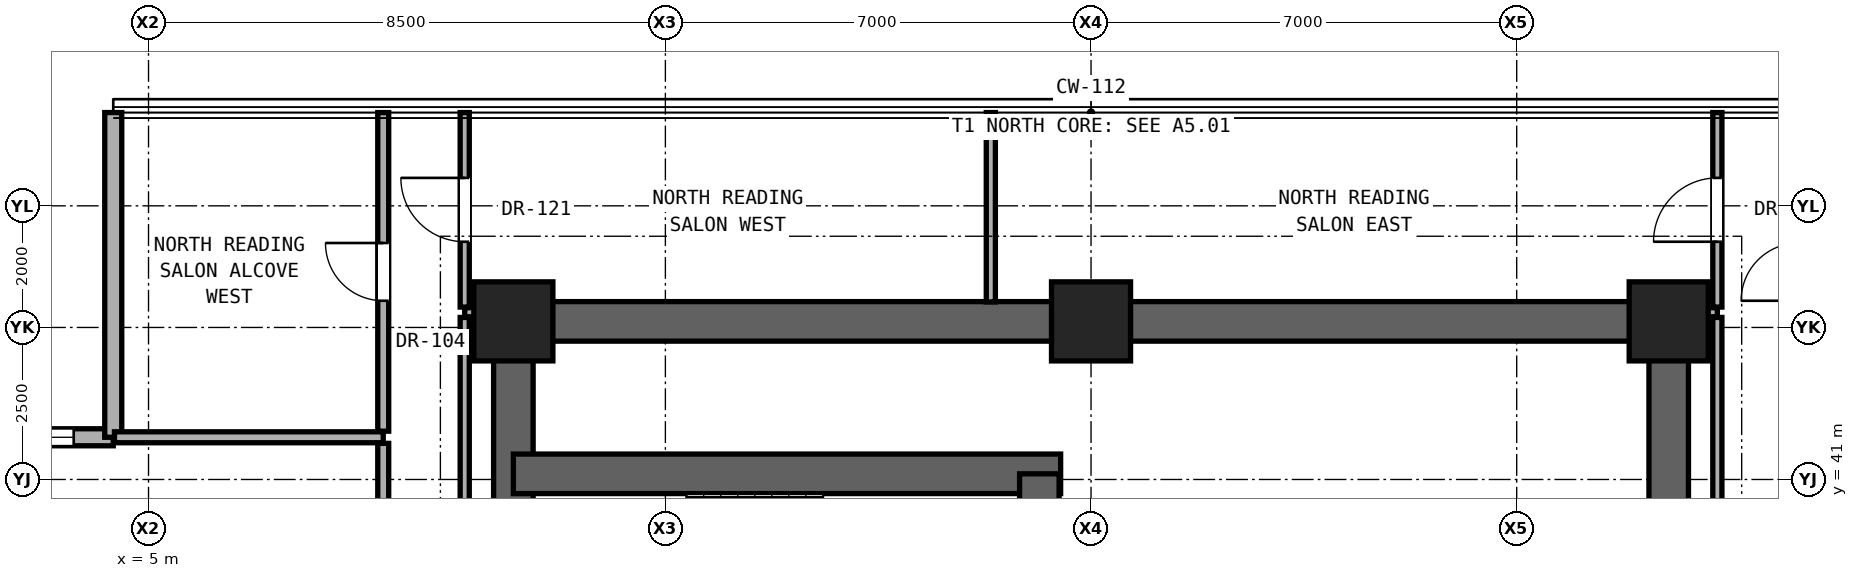
"""IFC4 building model, lengths in metres.
Left out: names, types, materials, properties, quantities, classifications, styles, units other than length and angle.
Written with IfcOpenShell. Run it as: python <this file> out.ifc"""

import sys

from ifc_helpers import new_model, si_unit, direction, frame, frame_2d, origin, origin_2d, place, context, subcontext, project, spatial, rectangle, extrude, element, fill, save


model = new_model("IFC4")
c1 = context("Model", 3, precision=1e-05, world=origin(), true_north=direction((0.0, 1.0)))
c2 = subcontext(c1, "Body", "Model", "MODEL_VIEW")
j1 = project(units=[si_unit("LENGTHUNIT", "METRE"), si_unit("PLANEANGLEUNIT", "RADIAN")], contexts=[c1])
p1 = place(None, origin())
s1 = spatial("IfcSite", under=j1, at=p1, CompositionType="ELEMENT")
p2 = place(p1, origin())
s2 = spatial("IfcBuilding", under=s1, at=p2, CompositionType="ELEMENT")
p3 = place(p2, frame((0.0, 0.0, 62.0)))
s3 = spatial("IfcBuildingStorey", under=s2, at=p3, CompositionType="ELEMENT", Elevation=62.0)
for number, where, z_axis, x_axis in (
    (1, (11.0, 43.6, 0.0), (0.0, 0.0, 1.0), (1.0, 0.0, 0.0)),
    (2, (20.5, 43.6, 0.0), (0.0, 0.0, 1.0), (1.0, 0.0, 0.0)),
    (3, (30.0, 43.6, 0.0), (0.0, 0.0, 1.0), (1.0, 0.0, 0.0)),
):
    element("IfcColumn", number, at=place(p3, frame(where, z_axis=z_axis, x_axis=x_axis)), inside=s3, PredefinedType="COLUMN", context=c2, shape_type="SweptSolid", body=[
        extrude(rectangle(XDim=1.3, YDim=1.3, at=origin_2d()), origin(), (0.0, 0.0, 1.0), 3.3),
    ])
p4 = place(p3, frame((11.0, 43.6, 0.0), z_axis=(0.0, 0.0, 1.0), x_axis=(1.0, 0.0, 0.0)))
e4 = element("IfcWall", 4, at=p4, inside=s3, PredefinedType="SHEAR", context=c2, shape_type="SweptSolid", body=[
    extrude(rectangle(XDim=19.0, YDim=0.65, at=frame_2d((9.5, 0.0))), origin(), (0.0, 0.0, 1.0), 3.06),
])
for number, where, z_axis, x_axis in (
    (5, (11.0, 37.6, 0.0), (0.0, 0.0, 1.0), (0.0, 1.0, 0.0)),
    (6, (30.0, 37.6, 0.0), (0.0, 0.0, 1.0), (0.0, 1.0, 0.0)),
):
    element("IfcWall", number, at=place(p3, frame(where, z_axis=z_axis, x_axis=x_axis)), inside=s3, PredefinedType="SHEAR", context=c2, shape_type="SweptSolid", body=[
        extrude(rectangle(XDim=6.0, YDim=0.65, at=frame_2d((3.0, 0.0))), origin(), (0.0, 0.0, 1.0), 3.06),
    ])
p5 = place(p3, frame((11.0, 41.093, 0.0), z_axis=(0.0, 0.0, 1.0), x_axis=(1.0, 0.0, 0.0)))
e7 = element("IfcWall", 7, at=p5, inside=s3, PredefinedType="SHEAR", context=c2, shape_type="SweptSolid", body=[
    extrude(rectangle(XDim=9.0, YDim=0.65, at=frame_2d((4.5, 0.0))), origin(), (0.0, 0.0, 1.0), 3.06),
])
p6 = place(p3, frame((19.65, 37.6, 0.0), z_axis=(0.0, 0.0, 1.0), x_axis=(0.0, 1.0, 0.0)))
e8 = element("IfcWall", 8, at=p6, inside=s3, PredefinedType="SHEAR", context=c2, shape_type="SweptSolid", body=[
    extrude(rectangle(XDim=3.493, YDim=0.65, at=frame_2d((1.747, 0.0))), origin(), (0.0, 0.0, 1.0), 3.06),
])
p7 = place(p3, frame((4.42, 41.694, 0.0), z_axis=(0.0, 0.0, 1.0), x_axis=(-1.0, 0.0, 0.0)))
e9 = element("IfcWall", 9, at=p7, inside=s3, PredefinedType="SOLIDWALL", context=c2, shape_type="SweptSolid", body=[
    extrude(rectangle(XDim=5.34, YDim=0.28, at=frame_2d((2.67, 0.0))), origin(), (0.0, 0.0, 1.0), 3.04),
])
p8 = place(p7, frame((0.65, 0.0, 0.85)))
e10 = element("IfcOpeningElement", 10, at=p8, cuts=e9, PredefinedType="OPENING", context=c2, shape_type="SweptSolid", body=[
    extrude(rectangle(XDim=1.1, YDim=2.0, at=frame_2d((0.55, 1.0))), frame((0.0, 0.15, 0.0), z_axis=(0.0, -1.0, 0.0), x_axis=(1.0, 0.0, 0.0)), (0.0, 0.0, 1.0), 0.3),
])
p9 = place(p3, frame((4.42, 47.034, 0.0), z_axis=(0.0, 0.0, 1.0), x_axis=(0.0, -1.0, 0.0)))
e11 = element("IfcWall", 11, at=p9, inside=s3, PredefinedType="SOLIDWALL", context=c2, shape_type="SweptSolid", body=[
    extrude(rectangle(XDim=5.34, YDim=0.28, at=frame_2d((2.67, 0.0))), origin(), (0.0, 0.0, 1.0), 3.04),
])
p10 = place(p3, frame((4.44, 41.694, 0.0), z_axis=(0.0, 0.0, 1.0), x_axis=(1.0, 0.0, 0.0)))
e12 = element("IfcWall", 12, at=p10, inside=s3, PredefinedType="PARTITIONING", context=c2, shape_type="SweptSolid", body=[
    extrude(rectangle(XDim=4.42, YDim=0.18, at=frame_2d((2.21, 0.0))), origin(), (0.0, 0.0, 1.0), 3.06),
])
for number, where, z_axis, x_axis in (
    (13, (10.2, 43.75, 0.0), (0.0, 0.0, 1.0), (1.0, 0.0, 0.0)),
    (14, (30.32, 43.75, 0.0), (0.0, 0.0, 1.0), (1.0, 0.0, 0.0)),
):
    element("IfcWall", number, at=place(p3, frame(where, z_axis=z_axis, x_axis=x_axis)), inside=s3, PredefinedType="PARTITIONING", context=c2, shape_type="SweptSolid", body=[
        extrude(rectangle(XDim=0.48, YDim=0.15, at=frame_2d((0.24, 0.0))), origin(), (0.0, 0.0, 1.0), 3.06),
    ])
p11 = place(p3, frame((8.86, 29.675, 0.0), z_axis=(0.0, 0.0, 1.0), x_axis=(0.0, 1.0, 0.0)))
e15 = element("IfcWall", 15, at=p11, inside=s3, PredefinedType="PARTITIONING", context=c2, shape_type="SweptSolid", body=[
    extrude(rectangle(XDim=11.919, YDim=0.18, at=frame_2d((5.959, 0.0))), origin(), (0.0, 0.0, 1.0), 2.279),
])
p12 = place(p11, frame((5.435, 0.0, 0.0)))
e16 = element("IfcOpeningElement", 16, at=p12, cuts=e15, PredefinedType="OPENING", context=c2, shape_type="SweptSolid", body=[
    extrude(rectangle(XDim=1.05, YDim=2.2, at=frame_2d((0.525, 1.1))), frame((0.0, 0.1, 0.0), z_axis=(0.0, -1.0, 0.0), x_axis=(1.0, 0.0, 0.0)), (0.0, 0.0, 1.0), 0.2),
])
p13 = place(p3, frame((8.86, 41.794, 0.0), z_axis=(0.0, 0.0, 1.0), x_axis=(0.0, 1.0, 0.0)))
e17 = element("IfcWall", 17, at=p13, inside=s3, PredefinedType="PARTITIONING", context=c2, shape_type="SweptSolid", body=[
    extrude(rectangle(XDim=5.24, YDim=0.18, at=frame_2d((2.62, 0.0))), origin(), (0.0, 0.0, 1.0), 3.06),
])
p14 = place(p13, frame((2.145, 0.0, 0.0)))
e18 = element("IfcOpeningElement", 18, at=p14, cuts=e17, PredefinedType="OPENING", context=c2, shape_type="SweptSolid", body=[
    extrude(rectangle(XDim=0.95, YDim=2.15, at=frame_2d((0.475, 1.075))), frame((0.0, 0.1, 0.0), z_axis=(0.0, -1.0, 0.0), x_axis=(1.0, 0.0, 0.0)), (0.0, 0.0, 1.0), 0.2),
])
p15 = place(p3, frame((10.2, 34.535, 0.0), z_axis=(0.0, 0.0, 1.0), x_axis=(0.0, 1.0, 0.0)))
e19 = element("IfcWall", 19, at=p15, inside=s3, PredefinedType="PARTITIONING", context=c2, shape_type="SweptSolid", body=[
    extrude(rectangle(XDim=9.13, YDim=0.15, at=frame_2d((4.565, 0.0))), origin(), (0.0, 0.0, 1.0), 2.436),
])
p16 = place(p3, frame((10.2, 43.835, 0.0), z_axis=(0.0, 0.0, 1.0), x_axis=(0.0, 1.0, 0.0)))
e20 = element("IfcWall", 20, at=p16, inside=s3, PredefinedType="PARTITIONING", context=c2, shape_type="SweptSolid", body=[
    extrude(rectangle(XDim=3.199, YDim=0.15, at=frame_2d((1.6, 0.0))), origin(), (0.0, 0.0, 1.0), 3.06),
])
p17 = place(p16, frame((1.074, 0.0, 0.0)))
e21 = element("IfcOpeningElement", 21, at=p17, cuts=e20, PredefinedType="OPENING", context=c2, shape_type="SweptSolid", body=[
    extrude(rectangle(XDim=1.05, YDim=2.2, at=frame_2d((0.525, 1.1))), frame((0.0, 0.085, 0.0), z_axis=(0.0, -1.0, 0.0), x_axis=(1.0, 0.0, 0.0)), (0.0, 0.0, 1.0), 0.17),
])
p18 = place(p3, frame((18.852, 43.92, 0.0), z_axis=(0.0, 0.0, 1.0), x_axis=(0.0, 1.0, 0.0)))
e22 = element("IfcWall", 22, at=p18, inside=s3, PredefinedType="PARTITIONING", context=c2, shape_type="SweptSolid", body=[
    extrude(rectangle(XDim=3.114, YDim=0.15, at=frame_2d((1.557, 0.0))), origin(), (0.0, 0.0, 1.0), 3.06),
])
p19 = place(p3, frame((30.8, 34.57, 0.0), z_axis=(0.0, 0.0, 1.0), x_axis=(0.0, 1.0, 0.0)))
e23 = element("IfcWall", 23, at=p19, inside=s3, PredefinedType="PARTITIONING", context=c2, shape_type="SweptSolid", body=[
    extrude(rectangle(XDim=9.095, YDim=0.15, at=frame_2d((4.547, 0.0))), origin(), (0.0, 0.0, 1.0), 2.436),
])
p20 = place(p3, frame((30.8, 43.835, 0.0), z_axis=(0.0, 0.0, 1.0), x_axis=(0.0, 1.0, 0.0)))
e24 = element("IfcWall", 24, at=p20, inside=s3, PredefinedType="PARTITIONING", context=c2, shape_type="SweptSolid", body=[
    extrude(rectangle(XDim=3.199, YDim=0.15, at=frame_2d((1.6, 0.0))), origin(), (0.0, 0.0, 1.0), 3.06),
])
p21 = place(p20, frame((1.074, 0.0, 0.0)))
e25 = element("IfcOpeningElement", 25, at=p21, cuts=e24, PredefinedType="OPENING", context=c2, shape_type="SweptSolid", body=[
    extrude(rectangle(XDim=1.05, YDim=2.2, at=frame_2d((0.525, 1.1))), frame((0.0, 0.085, 0.0), z_axis=(0.0, -1.0, 0.0), x_axis=(1.0, 0.0, 0.0)), (0.0, 0.0, 1.0), 0.17),
])
p22 = place(p8, origin())
e26 = element("IfcWindow", 26, at=p22, inside=s3, PartitioningType="SINGLE_PANEL", PredefinedType="WINDOW", context=c2, shape_type="SweptSolid", body=[
    extrude(rectangle(XDim=1.1, YDim=2.0, at=frame_2d((0.55, 1.0))), frame((0.0, 0.03, 0.0), z_axis=(0.0, -1.0, 0.0), x_axis=(1.0, 0.0, 0.0)), (0.0, 0.0, 1.0), 0.06),
])
fill(e10, e26)
p23 = place(p17, origin())
e27 = element("IfcDoor", 27, at=p23, inside=s3, OperationType="SINGLE_SWING_RIGHT", PredefinedType="DOOR", context=c2, shape_type="SweptSolid", body=[
    extrude(rectangle(XDim=1.05, YDim=2.2, at=frame_2d((0.525, 1.1))), frame((0.0, 0.025, 0.0), z_axis=(0.0, -1.0, 0.0), x_axis=(1.0, 0.0, 0.0)), (0.0, 0.0, 1.0), 0.05),
])
fill(e21, e27)
p24 = place(p21, origin())
e28 = element("IfcDoor", 28, at=p24, inside=s3, OperationType="SINGLE_SWING_LEFT", PredefinedType="DOOR", context=c2, shape_type="SweptSolid", body=[
    extrude(rectangle(XDim=1.05, YDim=2.2, at=frame_2d((0.525, 1.1))), frame((0.0, 0.025, 0.0), z_axis=(0.0, -1.0, 0.0), x_axis=(1.0, 0.0, 0.0)), (0.0, 0.0, 1.0), 0.05),
])
fill(e25, e28)
p25 = place(p14, origin())
e29 = element("IfcDoor", 29, at=p25, inside=s3, OperationType="SINGLE_SWING_RIGHT", PredefinedType="DOOR", context=c2, shape_type="SweptSolid", body=[
    extrude(rectangle(XDim=0.95, YDim=2.15, at=frame_2d((0.475, 1.075))), frame((0.0, 0.025, 0.0), z_axis=(0.0, -1.0, 0.0), x_axis=(1.0, 0.0, 0.0)), (0.0, 0.0, 1.0), 0.05),
])
fill(e18, e29)
save(model, sys.argv[1])
